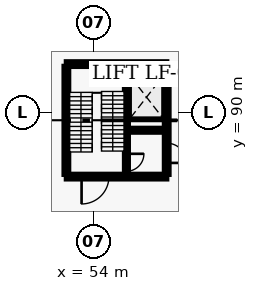
"""IFC4 building model, lengths in metres.
Left out: names, types, materials, properties, quantities, classifications, styles, units other than length and angle.
Written with IfcOpenShell. Run it as: python <this file> out.ifc"""

import sys

from ifc_helpers import new_model, si_unit, direction, frame, frame_2d, origin, place, context, subcontext, project, spatial, rectangle, extrude, element, fill, save


model = new_model("IFC4")
c1 = context("Model", 3, precision=1e-05, world=origin(), true_north=direction((0.0, 1.0)))
c2 = subcontext(c1, "Body", "Model", "MODEL_VIEW")
j1 = project(units=[si_unit("LENGTHUNIT", "METRE"), si_unit("PLANEANGLEUNIT", "RADIAN")], contexts=[c1])
p1 = place(None, origin())
s1 = spatial("IfcSite", under=j1, at=p1, CompositionType="ELEMENT")
p2 = place(p1, origin())
s2 = spatial("IfcBuilding", under=s1, at=p2, CompositionType="ELEMENT")
p3 = place(p2, origin())
s3 = spatial("IfcBuildingStorey", under=s2, at=p3, CompositionType="ELEMENT", Elevation=0.0)
p4 = place(p3, frame((52.2, 85.8, 0.0), z_axis=(0.0, 0.0, 1.0), x_axis=(1.0, 0.0, 0.0)))
e1 = element("IfcWall", 1, at=p4, inside=s3, PredefinedType="SHEAR", context=c2, shape_type="SweptSolid", body=[
    extrude(rectangle(XDim=6.6, YDim=0.3, at=frame_2d((3.3, 0.0))), origin(), (0.0, 0.0, 1.0), 5.4),
])
p5 = place(p4, frame((1.0, 0.0, 0.0)))
e2 = element("IfcOpeningElement", 2, at=p5, cuts=e1, PredefinedType="OPENING", context=c2, shape_type="SweptSolid", body=[
    extrude(rectangle(XDim=1.8, YDim=2.15, at=frame_2d((0.9, 1.075))), frame((0.0, 0.16, 0.0), z_axis=(0.0, -1.0, 0.0), x_axis=(1.0, 0.0, 0.0)), (0.0, 0.0, 1.0), 0.32),
])
p6 = place(p3, frame((52.2, 93.2, 0.0), z_axis=(0.0, 0.0, 1.0), x_axis=(1.0, 0.0, 0.0)))
e3 = element("IfcWall", 3, at=p6, inside=s3, PredefinedType="SHEAR", context=c2, shape_type="SweptSolid", body=[
    extrude(rectangle(XDim=6.6, YDim=0.3, at=frame_2d((3.3, 0.0))), origin(), (0.0, 0.0, 1.0), 5.4),
])
p7 = place(p3, frame((52.2, 85.95, 0.0), z_axis=(0.0, 0.0, 1.0), x_axis=(0.0, 1.0, 0.0)))
e4 = element("IfcWall", 4, at=p7, inside=s3, PredefinedType="SHEAR", context=c2, shape_type="SweptSolid", body=[
    extrude(rectangle(XDim=7.1, YDim=0.3, at=frame_2d((3.55, 0.0))), origin(), (0.0, 0.0, 1.0), 5.4),
])
p8 = place(p3, frame((58.8, 85.95, 0.0), z_axis=(0.0, 0.0, 1.0), x_axis=(0.0, 1.0, 0.0)))
e5 = element("IfcWall", 5, at=p8, inside=s3, PredefinedType="SHEAR", context=c2, shape_type="SweptSolid", body=[
    extrude(rectangle(XDim=7.1, YDim=0.3, at=frame_2d((3.55, 0.0))), origin(), (0.0, 0.0, 1.0), 5.4),
])
p9 = place(p8, frame((0.75, 0.0, 0.0)))
e6 = element("IfcOpeningElement", 6, at=p9, cuts=e5, PredefinedType="OPENING", context=c2, shape_type="SweptSolid", body=[
    extrude(rectangle(XDim=1.3, YDim=2.15, at=frame_2d((0.65, 1.075))), frame((0.0, 0.16, 0.0), z_axis=(0.0, -1.0, 0.0), x_axis=(1.0, 0.0, 0.0)), (0.0, 0.0, 1.0), 0.32),
])
p10 = place(p3, frame((56.15, 85.95, 0.0), z_axis=(0.0, 0.0, 1.0), x_axis=(0.0, 1.0, 0.0)))
e7 = element("IfcWall", 7, at=p10, inside=s3, PredefinedType="SHEAR", context=c2, shape_type="SweptSolid", body=[
    extrude(rectangle(XDim=7.1, YDim=0.25, at=frame_2d((3.55, 0.0))), origin(), (0.0, 0.0, 1.0), 5.4),
])
p11 = place(p10, frame((0.2, 0.0, 0.0)))
e8 = element("IfcOpeningElement", 8, at=p11, cuts=e7, PredefinedType="OPENING", context=c2, shape_type="SweptSolid", body=[
    extrude(rectangle(XDim=1.15, YDim=2.15, at=frame_2d((0.575, 1.075))), frame((0.0, 0.135, 0.0), z_axis=(0.0, -1.0, 0.0), x_axis=(1.0, 0.0, 0.0)), (0.0, 0.0, 1.0), 0.27),
])
p12 = place(p3, frame((56.27, 88.85, 0.0), z_axis=(0.0, 0.0, 1.0), x_axis=(1.0, 0.0, 0.0)))
e9 = element("IfcWall", 9, at=p12, inside=s3, PredefinedType="SHEAR", context=c2, shape_type="SweptSolid", body=[
    extrude(rectangle(XDim=2.38, YDim=0.25, at=frame_2d((1.19, 0.0))), origin(), (0.0, 0.0, 1.0), 5.4),
])
p13 = place(p12, frame((0.39, 0.0, 0.0)))
e10 = element("IfcOpeningElement", 10, at=p13, cuts=e9, PredefinedType="OPENING", context=c2, shape_type="SweptSolid", body=[
    extrude(rectangle(XDim=1.6, YDim=2.3, at=frame_2d((0.8, 1.15))), frame((0.0, 0.135, 0.0), z_axis=(0.0, -1.0, 0.0), x_axis=(1.0, 0.0, 0.0)), (0.0, 0.0, 1.0), 0.27),
])
p14 = place(p9, frame((1.3, 0.0, 0.0), z_axis=(0.0, 0.0, 1.0), x_axis=(-1.0, 0.0, 0.0)))
e11 = element("IfcDoor", 11, at=p14, inside=s3, OperationType="DOUBLE_DOOR_SINGLE_SWING", PredefinedType="DOOR", context=c2, shape_type="SweptSolid", body=[
    extrude(rectangle(XDim=1.3, YDim=2.15, at=frame_2d((0.65, 1.075))), frame((0.0, 0.025, 0.0), z_axis=(0.0, -1.0, 0.0), x_axis=(1.0, 0.0, 0.0)), (0.0, 0.0, 1.0), 0.05),
])
fill(e6, e11)
p15 = place(p11, origin())
e12 = element("IfcDoor", 12, at=p15, inside=s3, OperationType="SINGLE_SWING_RIGHT", PredefinedType="DOOR", context=c2, shape_type="SweptSolid", body=[
    extrude(rectangle(XDim=1.15, YDim=2.15, at=frame_2d((0.575, 1.075))), frame((0.0, 0.025, 0.0), z_axis=(0.0, -1.0, 0.0), x_axis=(1.0, 0.0, 0.0)), (0.0, 0.0, 1.0), 0.05),
])
fill(e8, e12)
p16 = place(p5, frame((1.8, 0.0, 0.0), z_axis=(0.0, 0.0, 1.0), x_axis=(-1.0, 0.0, 0.0)))
e13 = element("IfcDoor", 13, at=p16, inside=s3, OperationType="DOUBLE_DOOR_SINGLE_SWING", PredefinedType="DOOR", context=c2, shape_type="SweptSolid", body=[
    extrude(rectangle(XDim=1.8, YDim=2.15, at=frame_2d((0.9, 1.075))), frame((0.0, 0.025, 0.0), z_axis=(0.0, -1.0, 0.0), x_axis=(1.0, 0.0, 0.0)), (0.0, 0.0, 1.0), 0.05),
])
fill(e2, e13)
p17 = place(p13, origin())
e14 = element("IfcDoor", 14, at=p17, inside=s3, OperationType="SLIDING_TO_LEFT", PredefinedType="DOOR", context=c2, shape_type="SweptSolid", body=[
    extrude(rectangle(XDim=1.6, YDim=2.3, at=frame_2d((0.8, 1.15))), frame((0.0, 0.025, 0.0), z_axis=(0.0, -1.0, 0.0), x_axis=(1.0, 0.0, 0.0)), (0.0, 0.0, 1.0), 0.05),
])
fill(e10, e14)
save(model, sys.argv[1])
